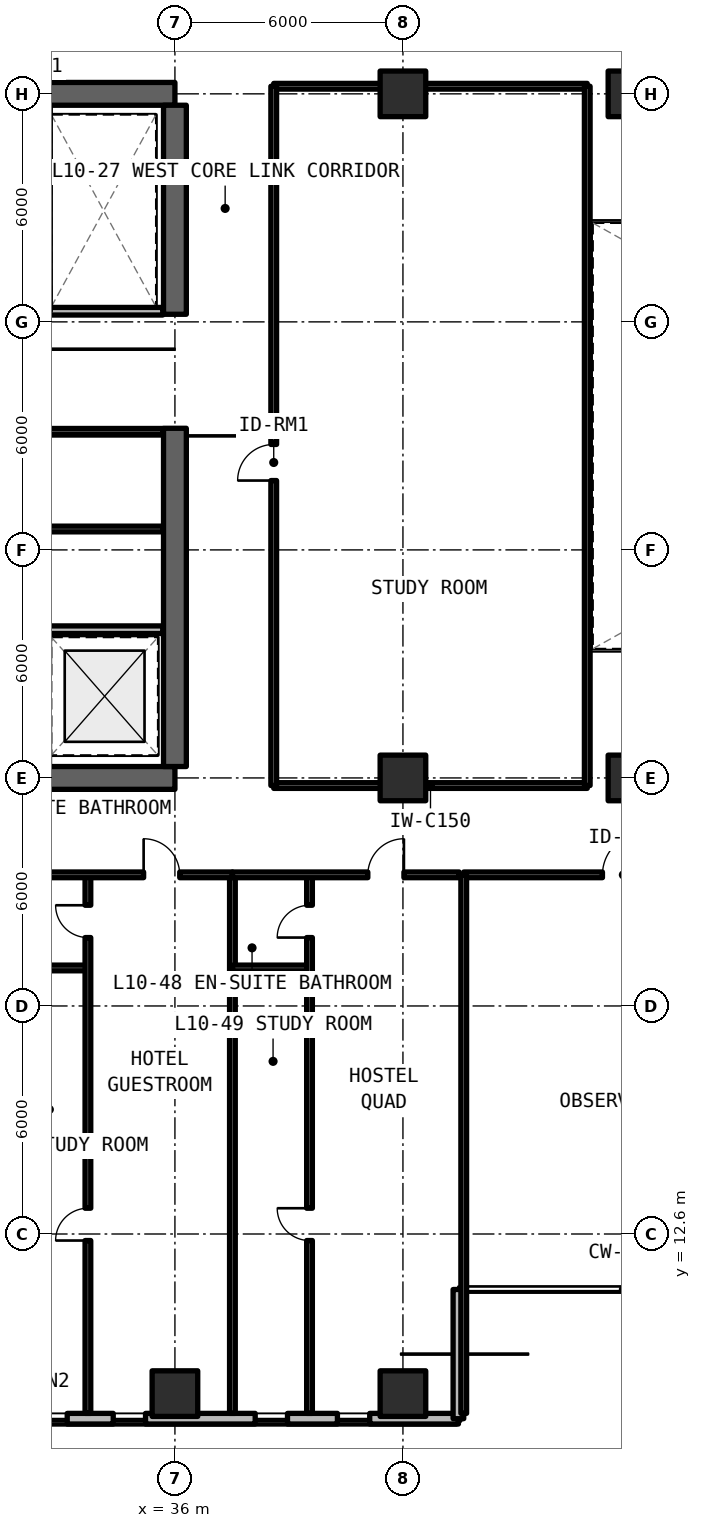
"""IFC4 building model, lengths in metres.
Left out: names, types, materials, properties, quantities, classifications, styles, units other than length and angle.
Written with IfcOpenShell. Run it as: python <this file> out.ifc"""

import sys

from ifc_helpers import new_model, si_unit, direction, frame, frame_2d, origin, origin_2d, place, context, subcontext, project, spatial, rectangle, extrude, element, fill, save


model = new_model("IFC4")
c1 = context("Model", 3, precision=1e-05, world=origin(), true_north=direction((0.0, 1.0)))
c2 = subcontext(c1, "Body", "Model", "MODEL_VIEW")
j1 = project(units=[si_unit("LENGTHUNIT", "METRE"), si_unit("PLANEANGLEUNIT", "RADIAN")], contexts=[c1])
p1 = place(None, origin())
s1 = spatial("IfcSite", under=j1, at=p1, CompositionType="ELEMENT")
p2 = place(p1, origin())
s2 = spatial("IfcBuilding", under=s1, at=p2, CompositionType="ELEMENT")
p3 = place(p2, frame((0.0, 0.0, 38.94)))
s3 = spatial("IfcBuildingStorey", under=s2, at=p3, CompositionType="ELEMENT", Elevation=38.94)
for number, where, z_axis, x_axis in (
    (1, (24.0, 24.6, 0.0), (0.0, 0.0, 1.0), (1.0, 0.0, 0.0)),
    (2, (36.0, 42.6, 0.0), (0.0, 0.0, 1.0), (-1.0, 0.0, 0.0)),
):
    element("IfcWall", number, at=place(p3, frame(where, z_axis=z_axis, x_axis=x_axis)), inside=s3, PredefinedType="SHEAR", context=c2, shape_type="SweptSolid", body=[
        extrude(rectangle(XDim=12.0, YDim=0.6, at=frame_2d((6.0, 0.0))), origin(), (0.0, 0.0, 1.0), 3.3),
    ])
p4 = place(p3, frame((36.0, 24.9, 0.0), z_axis=(0.0, 0.0, 1.0), x_axis=(0.0, 1.0, 0.0)))
e3 = element("IfcWall", 3, at=p4, inside=s3, PredefinedType="SHEAR", context=c2, shape_type="SweptSolid", body=[
    extrude(rectangle(XDim=8.9, YDim=0.6, at=frame_2d((4.45, 0.0))), origin(), (0.0, 0.0, 1.0), 3.3),
])
p5 = place(p3, frame((36.0, 36.8, 0.0), z_axis=(0.0, 0.0, 1.0), x_axis=(0.0, 1.0, 0.0)))
e4 = element("IfcWall", 4, at=p5, inside=s3, PredefinedType="SHEAR", context=c2, shape_type="SweptSolid", body=[
    extrude(rectangle(XDim=5.5, YDim=0.6, at=frame_2d((2.75, 0.0))), origin(), (0.0, 0.0, 1.0), 3.3),
])
for number, where, z_axis, x_axis in (
    (5, (42.0, 24.6, 0.0), (0.0, 0.0, 1.0), (1.0, 0.0, 0.0)),
    (6, (42.0, 42.6, 0.0), (0.0, 0.0, 1.0), (1.0, 0.0, 0.0)),
    (7, (48.0, 24.6, 0.0), (0.0, 0.0, 1.0), (1.0, 0.0, 0.0)),
    (8, (48.0, 42.6, 0.0), (0.0, 0.0, 1.0), (1.0, 0.0, 0.0)),
    (9, (36.0, 8.4, 0.0), (0.0, 0.0, 1.0), (1.0, 0.0, 0.0)),
    (10, (42.0, 8.4, 0.0), (0.0, 0.0, 1.0), (1.0, 0.0, 0.0)),
):
    element("IfcColumn", number, at=place(p3, frame(where, z_axis=z_axis, x_axis=x_axis)), inside=s3, PredefinedType="COLUMN", context=c2, shape_type="SweptSolid", body=[
        extrude(rectangle(XDim=1.2, YDim=1.2, at=origin_2d()), origin(), (0.0, 0.0, 1.0), 3.3),
    ])
p6 = place(p3, frame((20.858, 7.74, 0.0), z_axis=(0.0, 0.0, 1.0), x_axis=(1.0, 0.0, 0.0)))
e11 = element("IfcWall", 11, at=p6, inside=s3, PredefinedType="SOLIDWALL", context=c2, shape_type="SweptSolid", body=[
    extrude(rectangle(XDim=22.602, YDim=0.28, at=frame_2d((11.301, 0.0))), origin(), (0.0, 0.0, 1.0), 3.08),
])
p7 = place(p6, frame((5.142, 0.0, 0.0)))
e12 = element("IfcOpeningElement", 12, at=p7, cuts=e11, PredefinedType="OPENING", context=c2, shape_type="SweptSolid", body=[
    extrude(rectangle(XDim=1.1, YDim=2.15, at=frame_2d((0.55, 1.075))), frame((0.0, 0.15, 0.0), z_axis=(0.0, -1.0, 0.0), x_axis=(1.0, 0.0, 0.0)), (0.0, 0.0, 1.0), 0.3),
])
p8 = place(p6, frame((7.533, 0.0, 0.78)))
e13 = element("IfcOpeningElement", 13, at=p8, cuts=e11, PredefinedType="OPENING", context=c2, shape_type="SweptSolid", body=[
    extrude(rectangle(XDim=0.85, YDim=1.65, at=frame_2d((0.425, 0.825))), frame((0.0, 0.15, 0.0), z_axis=(0.0, -1.0, 0.0), x_axis=(1.0, 0.0, 0.0)), (0.0, 0.0, 1.0), 0.3),
])
p9 = place(p6, frame((11.458, 0.0, 0.78)))
e14 = element("IfcOpeningElement", 14, at=p9, cuts=e11, PredefinedType="OPENING", context=c2, shape_type="SweptSolid", body=[
    extrude(rectangle(XDim=0.85, YDim=1.65, at=frame_2d((0.425, 0.825))), frame((0.0, 0.15, 0.0), z_axis=(0.0, -1.0, 0.0), x_axis=(1.0, 0.0, 0.0)), (0.0, 0.0, 1.0), 0.3),
])
p10 = place(p6, frame((13.519, 0.0, 0.78)))
e15 = element("IfcOpeningElement", 15, at=p10, cuts=e11, PredefinedType="OPENING", context=c2, shape_type="SweptSolid", body=[
    extrude(rectangle(XDim=0.85, YDim=1.65, at=frame_2d((0.425, 0.825))), frame((0.0, 0.15, 0.0), z_axis=(0.0, -1.0, 0.0), x_axis=(1.0, 0.0, 0.0)), (0.0, 0.0, 1.0), 0.3),
])
p11 = place(p6, frame((17.254, 0.0, 0.78)))
e16 = element("IfcOpeningElement", 16, at=p11, cuts=e11, PredefinedType="OPENING", context=c2, shape_type="SweptSolid", body=[
    extrude(rectangle(XDim=0.85, YDim=1.65, at=frame_2d((0.425, 0.825))), frame((0.0, 0.15, 0.0), z_axis=(0.0, -1.0, 0.0), x_axis=(1.0, 0.0, 0.0)), (0.0, 0.0, 1.0), 0.3),
])
p12 = place(p6, frame((19.418, 0.0, 0.78)))
e17 = element("IfcOpeningElement", 17, at=p12, cuts=e11, PredefinedType="OPENING", context=c2, shape_type="SweptSolid", body=[
    extrude(rectangle(XDim=0.85, YDim=1.65, at=frame_2d((0.425, 0.825))), frame((0.0, 0.15, 0.0), z_axis=(0.0, -1.0, 0.0), x_axis=(1.0, 0.0, 0.0)), (0.0, 0.0, 1.0), 0.3),
])
p13 = place(p3, frame((43.46, 7.74, 0.0), z_axis=(0.0, 0.0, 1.0), x_axis=(0.0, 1.0, 0.0)))
e18 = element("IfcWall", 18, at=p13, inside=s3, PredefinedType="SOLIDWALL", context=c2, shape_type="SweptSolid", body=[
    extrude(rectangle(XDim=3.4, YDim=0.28, at=frame_2d((1.7, 0.0))), origin(), (0.0, 0.0, 1.0), 3.08),
])
p14 = place(p3, frame((28.32, 28.5, 0.0), z_axis=(0.0, 0.0, 1.0), x_axis=(1.0, 0.0, 0.0)))
e19 = element("IfcWall", 19, at=p14, inside=s3, PredefinedType="SOLIDWALL", context=c2, shape_type="SweptSolid", body=[
    extrude(rectangle(XDim=7.36, YDim=0.2, at=frame_2d((3.68, 0.0))), origin(), (0.0, 0.0, 1.0), 2.35),
])
p15 = place(p14, frame((2.88, 0.0, 0.0)))
e20 = element("IfcOpeningElement", 20, at=p15, cuts=e19, PredefinedType="OPENING", context=c2, shape_type="SweptSolid", body=[
    extrude(rectangle(XDim=1.0, YDim=2.15, at=frame_2d((0.5, 1.075))), frame((0.0, 0.11, 0.0), z_axis=(0.0, -1.0, 0.0), x_axis=(1.0, 0.0, 0.0)), (0.0, 0.0, 1.0), 0.22),
])
for number, where, z_axis, x_axis in (
    (21, (32.68, 31.15, 0.0), (0.0, 0.0, 1.0), (1.0, 0.0, 0.0)),
    (22, (32.68, 33.72, 0.0), (0.0, 0.0, 1.0), (1.0, 0.0, 0.0)),
):
    element("IfcWall", number, at=place(p3, frame(where, z_axis=z_axis, x_axis=x_axis)), inside=s3, PredefinedType="SOLIDWALL", context=c2, shape_type="SweptSolid", body=[
        extrude(rectangle(XDim=3.0, YDim=0.15, at=frame_2d((1.5, 0.0))), origin(), (0.0, 0.0, 1.0), 2.35),
    ])
p16 = place(p3, frame((32.68, 36.88, 0.0), z_axis=(0.0, 0.0, 1.0), x_axis=(1.0, 0.0, 0.0)))
e23 = element("IfcWall", 23, at=p16, inside=s3, PredefinedType="SOLIDWALL", context=c2, shape_type="SweptSolid", body=[
    extrude(rectangle(XDim=3.0, YDim=0.2, at=frame_2d((1.5, 0.0))), origin(), (0.0, 0.0, 1.0), 2.35),
])
for number, where, z_axis, x_axis in (
    (24, (38.6, 24.4, 0.0), (0.0, 0.0, 1.0), (1.0, 0.0, 0.0)),
    (25, (38.6, 42.8, 0.0), (0.0, 0.0, 1.0), (1.0, 0.0, 0.0)),
):
    element("IfcWall", number, at=place(p3, frame(where, z_axis=z_axis, x_axis=x_axis)), inside=s3, PredefinedType="SOLIDWALL", context=c2, shape_type="SweptSolid", body=[
        extrude(rectangle(XDim=8.25, YDim=0.15, at=frame_2d((4.125, 0.0))), origin(), (0.0, 0.0, 1.0), 2.295),
    ])
p17 = place(p3, frame((38.6, 24.4, 0.0), z_axis=(0.0, 0.0, 1.0), x_axis=(0.0, 1.0, 0.0)))
e26 = element("IfcWall", 26, at=p17, inside=s3, PredefinedType="SOLIDWALL", context=c2, shape_type="SweptSolid", body=[
    extrude(rectangle(XDim=18.4, YDim=0.15, at=frame_2d((9.2, 0.0))), origin(), (0.0, 0.0, 1.0), 2.35),
])
p18 = place(p17, frame((8.025, 0.0, 0.0)))
e27 = element("IfcOpeningElement", 27, at=p18, cuts=e26, PredefinedType="OPENING", context=c2, shape_type="SweptSolid", body=[
    extrude(rectangle(XDim=0.95, YDim=2.15, at=frame_2d((0.475, 1.075))), frame((0.0, 0.085, 0.0), z_axis=(0.0, -1.0, 0.0), x_axis=(1.0, 0.0, 0.0)), (0.0, 0.0, 1.0), 0.17),
])
p19 = place(p3, frame((46.85, 24.4, 0.0), z_axis=(0.0, 0.0, 1.0), x_axis=(0.0, 1.0, 0.0)))
e28 = element("IfcWall", 28, at=p19, inside=s3, PredefinedType="SOLIDWALL", context=c2, shape_type="SweptSolid", body=[
    extrude(rectangle(XDim=18.4, YDim=0.15, at=frame_2d((9.2, 0.0))), origin(), (0.0, 0.0, 1.0), 2.35),
])
p20 = place(p3, frame((43.6, 22.05, 0.0), z_axis=(0.0, 0.0, 1.0), x_axis=(1.0, 0.0, 0.0)))
e29 = element("IfcWall", 29, at=p20, inside=s3, PredefinedType="SOLIDWALL", context=c2, shape_type="SweptSolid", body=[
    extrude(rectangle(XDim=8.4, YDim=0.15, at=frame_2d((4.2, 0.0))), origin(), (0.0, 0.0, 1.0), 2.35),
])
p21 = place(p20, frame((3.65, 0.0, 0.0)))
e30 = element("IfcOpeningElement", 30, at=p21, cuts=e29, PredefinedType="OPENING", context=c2, shape_type="SweptSolid", body=[
    extrude(rectangle(XDim=1.1, YDim=2.15, at=frame_2d((0.55, 1.075))), frame((0.0, 0.085, 0.0), z_axis=(0.0, -1.0, 0.0), x_axis=(1.0, 0.0, 0.0)), (0.0, 0.0, 1.0), 0.17),
])
for number, where, z_axis, x_axis in (
    (31, (43.6, 7.88, 0.0), (0.0, 0.0, 1.0), (0.0, 1.0, 0.0)),
    (32, (37.513, 7.88, 0.0), (0.0, 0.0, 1.0), (0.0, 1.0, 0.0)),
):
    element("IfcWall", number, at=place(p3, frame(where, z_axis=z_axis, x_axis=x_axis)), inside=s3, PredefinedType="SOLIDWALL", context=c2, shape_type="SweptSolid", body=[
        extrude(rectangle(XDim=14.17, YDim=0.15, at=frame_2d((7.085, 0.0))), origin(), (0.0, 0.0, 1.0), 2.35),
    ])
p22 = place(p3, frame((31.751, 19.6, 0.0), z_axis=(0.0, 0.0, 1.0), x_axis=(1.0, 0.0, 0.0)))
e33 = element("IfcWall", 33, at=p22, inside=s3, PredefinedType="PARTITIONING", context=c2, shape_type="SweptSolid", body=[
    extrude(rectangle(XDim=1.959, YDim=0.15, at=frame_2d((0.979, 0.0))), origin(), (0.0, 0.0, 1.0), 2.35),
])
p23 = place(p3, frame((33.71, 7.88, 0.0), z_axis=(0.0, 0.0, 1.0), x_axis=(0.0, 1.0, 0.0)))
e34 = element("IfcWall", 34, at=p23, inside=s3, PredefinedType="PARTITIONING", context=c2, shape_type="SweptSolid", body=[
    extrude(rectangle(XDim=14.17, YDim=0.15, at=frame_2d((7.085, 0.0))), origin(), (0.0, 0.0, 1.0), 2.35),
])
p24 = place(p23, frame((4.548, 0.0, 0.0)))
e35 = element("IfcOpeningElement", 35, at=p24, cuts=e34, PredefinedType="OPENING", context=c2, shape_type="SweptSolid", body=[
    extrude(rectangle(XDim=0.85, YDim=2.1, at=frame_2d((0.425, 1.05))), frame((0.0, 0.085, 0.0), z_axis=(0.0, -1.0, 0.0), x_axis=(1.0, 0.0, 0.0)), (0.0, 0.0, 1.0), 0.17),
])
p25 = place(p23, frame((12.52, 0.0, 0.0)))
e36 = element("IfcOpeningElement", 36, at=p25, cuts=e34, PredefinedType="OPENING", context=c2, shape_type="SweptSolid", body=[
    extrude(rectangle(XDim=0.85, YDim=2.1, at=frame_2d((0.425, 1.05))), frame((0.0, 0.085, 0.0), z_axis=(0.0, -1.0, 0.0), x_axis=(1.0, 0.0, 0.0)), (0.0, 0.0, 1.0), 0.17),
])
p26 = place(p3, frame((31.751, 22.05, 0.0), z_axis=(0.0, 0.0, 1.0), x_axis=(1.0, 0.0, 0.0)))
e37 = element("IfcWall", 37, at=p26, inside=s3, PredefinedType="SOLIDWALL", context=c2, shape_type="SweptSolid", body=[
    extrude(rectangle(XDim=5.761, YDim=0.15, at=frame_2d((2.881, 0.0))), origin(), (0.0, 0.0, 1.0), 2.35),
])
p27 = place(p26, frame((3.425, 0.0, 0.0)))
e38 = element("IfcOpeningElement", 38, at=p27, cuts=e37, PredefinedType="OPENING", context=c2, shape_type="SweptSolid", body=[
    extrude(rectangle(XDim=0.95, YDim=2.15, at=frame_2d((0.475, 1.075))), frame((0.0, 0.085, 0.0), z_axis=(0.0, -1.0, 0.0), x_axis=(1.0, 0.0, 0.0)), (0.0, 0.0, 1.0), 0.17),
])
p28 = place(p3, frame((37.513, 19.6, 0.0), z_axis=(0.0, 0.0, 1.0), x_axis=(1.0, 0.0, 0.0)))
e39 = element("IfcWall", 39, at=p28, inside=s3, PredefinedType="PARTITIONING", context=c2, shape_type="SweptSolid", body=[
    extrude(rectangle(XDim=2.029, YDim=0.15, at=frame_2d((1.014, 0.0))), origin(), (0.0, 0.0, 1.0), 2.35),
])
p29 = place(p3, frame((39.542, 7.88, 0.0), z_axis=(0.0, 0.0, 1.0), x_axis=(0.0, 1.0, 0.0)))
e40 = element("IfcWall", 40, at=p29, inside=s3, PredefinedType="PARTITIONING", context=c2, shape_type="SweptSolid", body=[
    extrude(rectangle(XDim=14.17, YDim=0.15, at=frame_2d((7.085, 0.0))), origin(), (0.0, 0.0, 1.0), 2.35),
])
p30 = place(p29, frame((4.548, 0.0, 0.0)))
e41 = element("IfcOpeningElement", 41, at=p30, cuts=e40, PredefinedType="OPENING", context=c2, shape_type="SweptSolid", body=[
    extrude(rectangle(XDim=0.85, YDim=2.1, at=frame_2d((0.425, 1.05))), frame((0.0, 0.085, 0.0), z_axis=(0.0, -1.0, 0.0), x_axis=(1.0, 0.0, 0.0)), (0.0, 0.0, 1.0), 0.17),
])
p31 = place(p29, frame((12.52, 0.0, 0.0)))
e42 = element("IfcOpeningElement", 42, at=p31, cuts=e40, PredefinedType="OPENING", context=c2, shape_type="SweptSolid", body=[
    extrude(rectangle(XDim=0.85, YDim=2.1, at=frame_2d((0.425, 1.05))), frame((0.0, 0.085, 0.0), z_axis=(0.0, -1.0, 0.0), x_axis=(1.0, 0.0, 0.0)), (0.0, 0.0, 1.0), 0.17),
])
p32 = place(p3, frame((37.513, 22.05, 0.0), z_axis=(0.0, 0.0, 1.0), x_axis=(1.0, 0.0, 0.0)))
e43 = element("IfcWall", 43, at=p32, inside=s3, PredefinedType="SOLIDWALL", context=c2, shape_type="SweptSolid", body=[
    extrude(rectangle(XDim=5.967, YDim=0.15, at=frame_2d((2.984, 0.0))), origin(), (0.0, 0.0, 1.0), 2.35),
])
p33 = place(p32, frame((3.563, 0.0, 0.0)))
e44 = element("IfcOpeningElement", 44, at=p33, cuts=e43, PredefinedType="OPENING", context=c2, shape_type="SweptSolid", body=[
    extrude(rectangle(XDim=0.95, YDim=2.15, at=frame_2d((0.475, 1.075))), frame((0.0, 0.085, 0.0), z_axis=(0.0, -1.0, 0.0), x_axis=(1.0, 0.0, 0.0)), (0.0, 0.0, 1.0), 0.17),
])
p34 = place(p9, origin())
e45 = element("IfcWindow", 45, at=p34, inside=s3, PartitioningType="SINGLE_PANEL", PredefinedType="WINDOW", context=c2, shape_type="SweptSolid", body=[
    extrude(rectangle(XDim=0.85, YDim=1.65, at=frame_2d((0.425, 0.825))), frame((0.0, 0.03, 0.0), z_axis=(0.0, -1.0, 0.0), x_axis=(1.0, 0.0, 0.0)), (0.0, 0.0, 1.0), 0.06),
])
fill(e14, e45)
p35 = place(p10, origin())
e46 = element("IfcWindow", 46, at=p35, inside=s3, PartitioningType="SINGLE_PANEL", PredefinedType="WINDOW", context=c2, shape_type="SweptSolid", body=[
    extrude(rectangle(XDim=0.85, YDim=1.65, at=frame_2d((0.425, 0.825))), frame((0.0, 0.03, 0.0), z_axis=(0.0, -1.0, 0.0), x_axis=(1.0, 0.0, 0.0)), (0.0, 0.0, 1.0), 0.06),
])
fill(e15, e46)
p36 = place(p11, origin())
e47 = element("IfcWindow", 47, at=p36, inside=s3, PartitioningType="SINGLE_PANEL", PredefinedType="WINDOW", context=c2, shape_type="SweptSolid", body=[
    extrude(rectangle(XDim=0.85, YDim=1.65, at=frame_2d((0.425, 0.825))), frame((0.0, 0.03, 0.0), z_axis=(0.0, -1.0, 0.0), x_axis=(1.0, 0.0, 0.0)), (0.0, 0.0, 1.0), 0.06),
])
fill(e16, e47)
p37 = place(p12, origin())
e48 = element("IfcWindow", 48, at=p37, inside=s3, PartitioningType="SINGLE_PANEL", PredefinedType="WINDOW", context=c2, shape_type="SweptSolid", body=[
    extrude(rectangle(XDim=0.85, YDim=1.65, at=frame_2d((0.425, 0.825))), frame((0.0, 0.03, 0.0), z_axis=(0.0, -1.0, 0.0), x_axis=(1.0, 0.0, 0.0)), (0.0, 0.0, 1.0), 0.06),
])
fill(e17, e48)
p38 = place(p18, origin())
e49 = element("IfcDoor", 49, at=p38, inside=s3, OperationType="SINGLE_SWING_LEFT", PredefinedType="DOOR", context=c2, shape_type="SweptSolid", body=[
    extrude(rectangle(XDim=0.95, YDim=2.15, at=frame_2d((0.475, 1.075))), frame((0.0, 0.025, 0.0), z_axis=(0.0, -1.0, 0.0), x_axis=(1.0, 0.0, 0.0)), (0.0, 0.0, 1.0), 0.05),
])
fill(e27, e49)
p39 = place(p21, origin())
e50 = element("IfcDoor", 50, at=p39, inside=s3, OperationType="SINGLE_SWING_RIGHT", PredefinedType="DOOR", context=c2, shape_type="SweptSolid", body=[
    extrude(rectangle(XDim=1.1, YDim=2.15, at=frame_2d((0.55, 1.075))), frame((0.0, 0.025, 0.0), z_axis=(0.0, -1.0, 0.0), x_axis=(1.0, 0.0, 0.0)), (0.0, 0.0, 1.0), 0.05),
])
fill(e30, e50)
p40 = place(p24, origin())
e51 = element("IfcDoor", 51, at=p40, inside=s3, OperationType="SINGLE_SWING_LEFT", PredefinedType="DOOR", context=c2, shape_type="SweptSolid", body=[
    extrude(rectangle(XDim=0.85, YDim=2.1, at=frame_2d((0.425, 1.05))), frame((0.0, 0.025, 0.0), z_axis=(0.0, -1.0, 0.0), x_axis=(1.0, 0.0, 0.0)), (0.0, 0.0, 1.0), 0.05),
])
fill(e35, e51)
p41 = place(p25, origin())
e52 = element("IfcDoor", 52, at=p41, inside=s3, OperationType="SINGLE_SWING_RIGHT", PredefinedType="DOOR", context=c2, shape_type="SweptSolid", body=[
    extrude(rectangle(XDim=0.85, YDim=2.1, at=frame_2d((0.425, 1.05))), frame((0.0, 0.025, 0.0), z_axis=(0.0, -1.0, 0.0), x_axis=(1.0, 0.0, 0.0)), (0.0, 0.0, 1.0), 0.05),
])
fill(e36, e52)
p42 = place(p27, origin())
e53 = element("IfcDoor", 53, at=p42, inside=s3, OperationType="SINGLE_SWING_LEFT", PredefinedType="DOOR", context=c2, shape_type="SweptSolid", body=[
    extrude(rectangle(XDim=0.95, YDim=2.15, at=frame_2d((0.475, 1.075))), frame((0.0, 0.025, 0.0), z_axis=(0.0, -1.0, 0.0), x_axis=(1.0, 0.0, 0.0)), (0.0, 0.0, 1.0), 0.05),
])
fill(e38, e53)
p43 = place(p30, origin())
e54 = element("IfcDoor", 54, at=p43, inside=s3, OperationType="SINGLE_SWING_RIGHT", PredefinedType="DOOR", context=c2, shape_type="SweptSolid", body=[
    extrude(rectangle(XDim=0.85, YDim=2.1, at=frame_2d((0.425, 1.05))), frame((0.0, 0.025, 0.0), z_axis=(0.0, -1.0, 0.0), x_axis=(1.0, 0.0, 0.0)), (0.0, 0.0, 1.0), 0.05),
])
fill(e41, e54)
p44 = place(p31, origin())
e55 = element("IfcDoor", 55, at=p44, inside=s3, OperationType="SINGLE_SWING_LEFT", PredefinedType="DOOR", context=c2, shape_type="SweptSolid", body=[
    extrude(rectangle(XDim=0.85, YDim=2.1, at=frame_2d((0.425, 1.05))), frame((0.0, 0.025, 0.0), z_axis=(0.0, -1.0, 0.0), x_axis=(1.0, 0.0, 0.0)), (0.0, 0.0, 1.0), 0.05),
])
fill(e42, e55)
p45 = place(p33, origin())
e56 = element("IfcDoor", 56, at=p45, inside=s3, OperationType="SINGLE_SWING_RIGHT", PredefinedType="DOOR", context=c2, shape_type="SweptSolid", body=[
    extrude(rectangle(XDim=0.95, YDim=2.15, at=frame_2d((0.475, 1.075))), frame((0.0, 0.025, 0.0), z_axis=(0.0, -1.0, 0.0), x_axis=(1.0, 0.0, 0.0)), (0.0, 0.0, 1.0), 0.05),
])
fill(e44, e56)
save(model, sys.argv[1])
